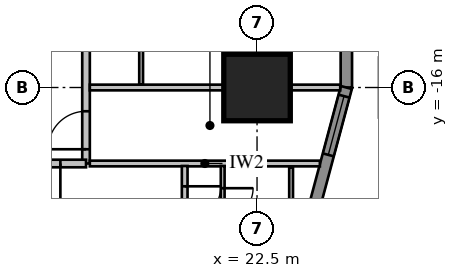
"""IFC4 building model, lengths in metres.
Left out: names, types, materials, properties, quantities, classifications, styles, units other than length and angle.
Written with IfcOpenShell. Run it as: python <this file> out.ifc"""

import sys

from ifc_helpers import new_model, si_unit, direction, frame, frame_2d, origin, origin_2d, place, context, subcontext, project, spatial, rectangle, extrude, element, fill, save


model = new_model("IFC4")
c1 = context("Model", 3, precision=1e-05, world=origin(), true_north=direction((0.0, 1.0)))
c2 = subcontext(c1, "Body", "Model", "MODEL_VIEW")
j1 = project(units=[si_unit("LENGTHUNIT", "METRE"), si_unit("PLANEANGLEUNIT", "RADIAN")], contexts=[c1])
p1 = place(None, origin())
s1 = spatial("IfcSite", under=j1, at=p1, CompositionType="ELEMENT")
p2 = place(p1, origin())
s2 = spatial("IfcBuilding", under=s1, at=p2, CompositionType="ELEMENT")
p3 = place(p2, frame((0.0, 0.0, 23.7)))
s3 = spatial("IfcBuildingStorey", under=s2, at=p3, CompositionType="ELEMENT", Elevation=23.7)
p4 = place(p3, frame((22.5, -16.0, 0.0), z_axis=(0.0, 0.0, 1.0), x_axis=(1.0, 0.0, 0.0)))
e1 = element("IfcColumn", 1, at=p4, inside=s3, PredefinedType="COLUMN", context=c2, shape_type="SweptSolid", body=[
    extrude(rectangle(XDim=1.75, YDim=1.75, at=origin_2d()), origin(), (0.0, 0.0, 1.0), 3.85),
])
p5 = place(p3, frame((24.85, -16.0, 0.0), z_axis=(0.0, 0.0, 1.0), x_axis=(0.0, 1.0, 0.0)))
e2 = element("IfcWall", 2, at=p5, inside=s3, PredefinedType="SOLIDWALL", context=c2, shape_type="SweptSolid", body=[
    extrude(rectangle(XDim=32.0, YDim=0.3, at=frame_2d((16.0, 0.0))), origin(), (0.0, 0.0, 1.0), 3.65),
])
p6 = place(p5, frame((1.2, 0.0, 0.75)))
e3 = element("IfcOpeningElement", 3, at=p6, cuts=e2, PredefinedType="OPENING", context=c2, shape_type="SweptSolid", body=[
    extrude(rectangle(XDim=1.6, YDim=1.8, at=frame_2d((0.8, 0.9))), frame((0.0, 0.17, 0.0), z_axis=(0.0, -1.0, 0.0), x_axis=(1.0, 0.0, 0.0)), (0.0, 0.0, 1.0), 0.34),
])
p7 = place(p5, frame((5.2, 0.0, 0.75)))
e4 = element("IfcOpeningElement", 4, at=p7, cuts=e2, PredefinedType="OPENING", context=c2, shape_type="SweptSolid", body=[
    extrude(rectangle(XDim=1.6, YDim=1.8, at=frame_2d((0.8, 0.9))), frame((0.0, 0.17, 0.0), z_axis=(0.0, -1.0, 0.0), x_axis=(1.0, 0.0, 0.0)), (0.0, 0.0, 1.0), 0.34),
])
p8 = place(p5, frame((17.2, 0.0, 0.75)))
e5 = element("IfcOpeningElement", 5, at=p8, cuts=e2, PredefinedType="OPENING", context=c2, shape_type="SweptSolid", body=[
    extrude(rectangle(XDim=1.6, YDim=1.8, at=frame_2d((0.8, 0.9))), frame((0.0, 0.17, 0.0), z_axis=(0.0, -1.0, 0.0), x_axis=(1.0, 0.0, 0.0)), (0.0, 0.0, 1.0), 0.34),
])
p9 = place(p5, frame((21.2, 0.0, 0.75)))
e6 = element("IfcOpeningElement", 6, at=p9, cuts=e2, PredefinedType="OPENING", context=c2, shape_type="SweptSolid", body=[
    extrude(rectangle(XDim=1.6, YDim=1.8, at=frame_2d((0.8, 0.9))), frame((0.0, 0.17, 0.0), z_axis=(0.0, -1.0, 0.0), x_axis=(1.0, 0.0, 0.0)), (0.0, 0.0, 1.0), 0.34),
])
p10 = place(p5, frame((25.2, 0.0, 0.75)))
e7 = element("IfcOpeningElement", 7, at=p10, cuts=e2, PredefinedType="OPENING", context=c2, shape_type="SweptSolid", body=[
    extrude(rectangle(XDim=1.6, YDim=1.8, at=frame_2d((0.8, 0.9))), frame((0.0, 0.17, 0.0), z_axis=(0.0, -1.0, 0.0), x_axis=(1.0, 0.0, 0.0)), (0.0, 0.0, 1.0), 0.34),
])
p11 = place(p5, frame((29.2, 0.0, 0.75)))
e8 = element("IfcOpeningElement", 8, at=p11, cuts=e2, PredefinedType="OPENING", context=c2, shape_type="SweptSolid", body=[
    extrude(rectangle(XDim=1.6, YDim=1.8, at=frame_2d((0.8, 0.9))), frame((0.0, 0.17, 0.0), z_axis=(0.0, -1.0, 0.0), x_axis=(1.0, 0.0, 0.0)), (0.0, 0.0, 1.0), 0.34),
])
p12 = place(p5, frame((8.8, 0.0, 0.75)))
e9 = element("IfcOpeningElement", 9, at=p12, cuts=e2, PredefinedType="OPENING", context=c2, shape_type="SweptSolid", body=[
    extrude(rectangle(XDim=2.4, YDim=1.8, at=frame_2d((1.2, 0.9))), frame((0.0, 0.17, 0.0), z_axis=(0.0, -1.0, 0.0), x_axis=(1.0, 0.0, 0.0)), (0.0, 0.0, 1.0), 0.34),
])
p13 = place(p5, frame((13.812, 0.0, 0.0)))
e10 = element("IfcOpeningElement", 10, at=p13, cuts=e2, PredefinedType="OPENING", context=c2, shape_type="SweptSolid", body=[
    extrude(rectangle(XDim=1.0, YDim=2.4, at=frame_2d((0.5, 1.2))), frame((0.0, 0.17, 0.0), z_axis=(0.0, -1.0, 0.0), x_axis=(1.0, 0.0, 0.0)), (0.0, 0.0, 1.0), 0.34),
])
p14 = place(p3, frame((23.664, -20.425, 0.0), z_axis=(0.0, 0.0, 1.0), x_axis=(0.258839972501, 0.965920218567, 0.0)))
e11 = element("IfcWall", 11, at=p14, inside=s3, PredefinedType="SOLIDWALL", context=c2, shape_type="SweptSolid", body=[
    extrude(rectangle(XDim=4.581, YDim=0.3, at=frame_2d((2.291, 0.0))), origin(), (0.0, 0.0, 1.0), 3.65),
])
p15 = place(p14, frame((2.746, 0.0, 0.75)))
e12 = element("IfcOpeningElement", 12, at=p15, cuts=e11, PredefinedType="OPENING", context=c2, shape_type="SweptSolid", body=[
    extrude(rectangle(XDim=1.6, YDim=1.8, at=frame_2d((0.8, 0.9))), frame((0.0, 0.17, 0.0), z_axis=(0.0, -1.0, 0.0), x_axis=(1.0, 0.0, 0.0)), (0.0, 0.0, 1.0), 0.34),
])
p16 = place(p3, frame((18.0, -18.0, 0.0), z_axis=(0.0, 0.0, 1.0), x_axis=(0.0, 1.0, 0.0)))
e13 = element("IfcWall", 13, at=p16, inside=s3, PredefinedType="PARTITIONING", context=c2, shape_type="SweptSolid", body=[
    extrude(rectangle(XDim=36.0, YDim=0.2, at=frame_2d((18.0, 0.0))), origin(), (0.0, 0.0, 1.0), 3.65),
])
p17 = place(p16, frame((10.4, 0.0, 0.0)))
e14 = element("IfcOpeningElement", 14, at=p17, cuts=e13, PredefinedType="OPENING", context=c2, shape_type="SweptSolid", body=[
    extrude(rectangle(XDim=1.0, YDim=2.1, at=frame_2d((0.5, 1.05))), frame((0.0, 0.12, 0.0), z_axis=(0.0, -1.0, 0.0), x_axis=(1.0, 0.0, 0.0)), (0.0, 0.0, 1.0), 0.24),
])
p18 = place(p16, frame((0.375, 0.0, 0.0)))
e15 = element("IfcOpeningElement", 15, at=p18, cuts=e13, PredefinedType="OPENING", context=c2, shape_type="SweptSolid", body=[
    extrude(rectangle(XDim=1.0, YDim=2.1, at=frame_2d((0.5, 1.05))), frame((0.0, 0.12, 0.0), z_axis=(0.0, -1.0, 0.0), x_axis=(1.0, 0.0, 0.0)), (0.0, 0.0, 1.0), 0.24),
])
p19 = place(p16, frame((34.375, 0.0, 0.0)))
e16 = element("IfcOpeningElement", 16, at=p19, cuts=e13, PredefinedType="OPENING", context=c2, shape_type="SweptSolid", body=[
    extrude(rectangle(XDim=0.95, YDim=2.1, at=frame_2d((0.475, 1.05))), frame((0.0, 0.12, 0.0), z_axis=(0.0, -1.0, 0.0), x_axis=(1.0, 0.0, 0.0)), (0.0, 0.0, 1.0), 0.24),
])
p20 = place(p3, frame((19.45, -15.925, 0.0), z_axis=(0.0, 0.0, 1.0), x_axis=(0.0, 1.0, 0.0)))
e17 = element("IfcWall", 17, at=p20, inside=s3, PredefinedType="PARTITIONING", context=c2, shape_type="SweptSolid", body=[
    extrude(rectangle(XDim=31.85, YDim=0.1, at=frame_2d((15.925, 0.0))), origin(), (0.0, 0.0, 1.0), 3.65),
])
p21 = place(p20, frame((10.125, 0.0, 0.0)))
e18 = element("IfcOpeningElement", 18, at=p21, cuts=e17, PredefinedType="OPENING", context=c2, shape_type="SweptSolid", body=[
    extrude(rectangle(XDim=1.0, YDim=2.1, at=frame_2d((0.5, 1.05))), frame((0.0, 0.07, 0.0), z_axis=(0.0, -1.0, 0.0), x_axis=(1.0, 0.0, 0.0)), (0.0, 0.0, 1.0), 0.14),
])
p22 = place(p20, frame((8.3, 0.0, 0.0)))
e19 = element("IfcOpeningElement", 19, at=p22, cuts=e17, PredefinedType="OPENING", context=c2, shape_type="SweptSolid", body=[
    extrude(rectangle(XDim=0.8, YDim=2.1, at=frame_2d((0.4, 1.05))), frame((0.0, 0.07, 0.0), z_axis=(0.0, -1.0, 0.0), x_axis=(1.0, 0.0, 0.0)), (0.0, 0.0, 1.0), 0.14),
])
p23 = place(p20, frame((1.725, 0.0, 0.0)))
e20 = element("IfcOpeningElement", 20, at=p23, cuts=e17, PredefinedType="OPENING", context=c2, shape_type="SweptSolid", body=[
    extrude(rectangle(XDim=0.95, YDim=2.1, at=frame_2d((0.475, 1.05))), frame((0.0, 0.07, 0.0), z_axis=(0.0, -1.0, 0.0), x_axis=(1.0, 0.0, 0.0)), (0.0, 0.0, 1.0), 0.14),
])
p24 = place(p20, frame((5.725, 0.0, 0.0)))
e21 = element("IfcOpeningElement", 21, at=p24, cuts=e17, PredefinedType="OPENING", context=c2, shape_type="SweptSolid", body=[
    extrude(rectangle(XDim=0.95, YDim=2.1, at=frame_2d((0.475, 1.05))), frame((0.0, 0.07, 0.0), z_axis=(0.0, -1.0, 0.0), x_axis=(1.0, 0.0, 0.0)), (0.0, 0.0, 1.0), 0.14),
])
p25 = place(p20, frame((17.725, 0.0, 0.0)))
e22 = element("IfcOpeningElement", 22, at=p25, cuts=e17, PredefinedType="OPENING", context=c2, shape_type="SweptSolid", body=[
    extrude(rectangle(XDim=0.95, YDim=2.1, at=frame_2d((0.475, 1.05))), frame((0.0, 0.07, 0.0), z_axis=(0.0, -1.0, 0.0), x_axis=(1.0, 0.0, 0.0)), (0.0, 0.0, 1.0), 0.14),
])
p26 = place(p20, frame((21.725, 0.0, 0.0)))
e23 = element("IfcOpeningElement", 23, at=p26, cuts=e17, PredefinedType="OPENING", context=c2, shape_type="SweptSolid", body=[
    extrude(rectangle(XDim=0.95, YDim=2.1, at=frame_2d((0.475, 1.05))), frame((0.0, 0.07, 0.0), z_axis=(0.0, -1.0, 0.0), x_axis=(1.0, 0.0, 0.0)), (0.0, 0.0, 1.0), 0.14),
])
p27 = place(p20, frame((25.725, 0.0, 0.0)))
e24 = element("IfcOpeningElement", 24, at=p27, cuts=e17, PredefinedType="OPENING", context=c2, shape_type="SweptSolid", body=[
    extrude(rectangle(XDim=0.95, YDim=2.1, at=frame_2d((0.475, 1.05))), frame((0.0, 0.07, 0.0), z_axis=(0.0, -1.0, 0.0), x_axis=(1.0, 0.0, 0.0)), (0.0, 0.0, 1.0), 0.14),
])
p28 = place(p20, frame((29.725, 0.0, 0.0)))
e25 = element("IfcOpeningElement", 25, at=p28, cuts=e17, PredefinedType="OPENING", context=c2, shape_type="SweptSolid", body=[
    extrude(rectangle(XDim=0.95, YDim=2.1, at=frame_2d((0.475, 1.05))), frame((0.0, 0.07, 0.0), z_axis=(0.0, -1.0, 0.0), x_axis=(1.0, 0.0, 0.0)), (0.0, 0.0, 1.0), 0.14),
])
p29 = place(p3, frame((18.1, -18.0, 0.0), z_axis=(0.0, 0.0, 1.0), x_axis=(1.0, 0.0, 0.0)))
e26 = element("IfcWall", 26, at=p29, inside=s3, PredefinedType="PARTITIONING", context=c2, shape_type="SweptSolid", body=[
    extrude(rectangle(XDim=6.053, YDim=0.15, at=frame_2d((3.027, 0.0))), origin(), (0.0, 0.0, 1.0), 3.65),
])
p30 = place(p3, frame((18.1, -16.0, 0.0), z_axis=(0.0, 0.0, 1.0), x_axis=(1.0, 0.0, 0.0)))
e27 = element("IfcWall", 27, at=p30, inside=s3, PredefinedType="PARTITIONING", context=c2, shape_type="SweptSolid", body=[
    extrude(rectangle(XDim=6.589, YDim=0.15, at=frame_2d((3.295, 0.0))), origin(), (0.0, 0.0, 1.0), 3.65),
])
p31 = place(p3, frame((22.15, -15.925, 0.0), z_axis=(0.0, 0.0, 1.0), x_axis=(0.0, 1.0, 0.0)))
e28 = element("IfcWall", 28, at=p31, inside=s3, PredefinedType="PARTITIONING", context=c2, shape_type="SweptSolid", body=[
    extrude(rectangle(XDim=1.45, YDim=0.1, at=frame_2d((0.725, 0.0))), origin(), (0.0, 0.0, 1.0), 3.65),
])
p32 = place(p3, frame((-18.0, -18.0, 0.0), z_axis=(0.0, 0.0, 1.0), x_axis=(1.0, 0.0, 0.0)))
e29 = element("IfcWall", 29, at=p32, inside=s3, PredefinedType="PARTITIONING", context=c2, shape_type="SweptSolid", body=[
    extrude(rectangle(XDim=36.0, YDim=0.2, at=frame_2d((18.0, 0.0))), origin(), (0.0, 0.0, 1.0), 3.65),
])
p33 = place(p32, frame((0.375, 0.0, 0.0)))
e30 = element("IfcOpeningElement", 30, at=p33, cuts=e29, PredefinedType="OPENING", context=c2, shape_type="SweptSolid", body=[
    extrude(rectangle(XDim=1.0, YDim=2.1, at=frame_2d((0.5, 1.05))), frame((0.0, 0.12, 0.0), z_axis=(0.0, -1.0, 0.0), x_axis=(1.0, 0.0, 0.0)), (0.0, 0.0, 1.0), 0.24),
])
p34 = place(p32, frame((2.45, 0.0, 0.0)))
e31 = element("IfcOpeningElement", 31, at=p34, cuts=e29, PredefinedType="OPENING", context=c2, shape_type="SweptSolid", body=[
    extrude(rectangle(XDim=0.8, YDim=2.1, at=frame_2d((0.4, 1.05))), frame((0.0, 0.12, 0.0), z_axis=(0.0, -1.0, 0.0), x_axis=(1.0, 0.0, 0.0)), (0.0, 0.0, 1.0), 0.24),
])
p35 = place(p32, frame((4.05, 0.0, 0.0)))
e32 = element("IfcOpeningElement", 32, at=p35, cuts=e29, PredefinedType="OPENING", context=c2, shape_type="SweptSolid", body=[
    extrude(rectangle(XDim=1.0, YDim=2.1, at=frame_2d((0.5, 1.05))), frame((0.0, 0.12, 0.0), z_axis=(0.0, -1.0, 0.0), x_axis=(1.0, 0.0, 0.0)), (0.0, 0.0, 1.0), 0.24),
])
p36 = place(p32, frame((6.45, 0.0, 0.0)))
e33 = element("IfcOpeningElement", 33, at=p36, cuts=e29, PredefinedType="OPENING", context=c2, shape_type="SweptSolid", body=[
    extrude(rectangle(XDim=0.9, YDim=2.1, at=frame_2d((0.45, 1.05))), frame((0.0, 0.12, 0.0), z_axis=(0.0, -1.0, 0.0), x_axis=(1.0, 0.0, 0.0)), (0.0, 0.0, 1.0), 0.24),
])
p37 = place(p32, frame((8.15, 0.0, 0.0)))
e34 = element("IfcOpeningElement", 34, at=p37, cuts=e29, PredefinedType="OPENING", context=c2, shape_type="SweptSolid", body=[
    extrude(rectangle(XDim=1.0, YDim=2.1, at=frame_2d((0.5, 1.05))), frame((0.0, 0.12, 0.0), z_axis=(0.0, -1.0, 0.0), x_axis=(1.0, 0.0, 0.0)), (0.0, 0.0, 1.0), 0.24),
])
p38 = place(p32, frame((19.8, 0.0, 0.0)))
e35 = element("IfcOpeningElement", 35, at=p38, cuts=e29, PredefinedType="OPENING", context=c2, shape_type="SweptSolid", body=[
    extrude(rectangle(XDim=0.95, YDim=2.1, at=frame_2d((0.475, 1.05))), frame((0.0, 0.12, 0.0), z_axis=(0.0, -1.0, 0.0), x_axis=(1.0, 0.0, 0.0)), (0.0, 0.0, 1.0), 0.24),
])
p39 = place(p32, frame((23.8, 0.0, 0.0)))
e36 = element("IfcOpeningElement", 36, at=p39, cuts=e29, PredefinedType="OPENING", context=c2, shape_type="SweptSolid", body=[
    extrude(rectangle(XDim=0.95, YDim=2.1, at=frame_2d((0.475, 1.05))), frame((0.0, 0.12, 0.0), z_axis=(0.0, -1.0, 0.0), x_axis=(1.0, 0.0, 0.0)), (0.0, 0.0, 1.0), 0.24),
])
p40 = place(p32, frame((27.8, 0.0, 0.0)))
e37 = element("IfcOpeningElement", 37, at=p40, cuts=e29, PredefinedType="OPENING", context=c2, shape_type="SweptSolid", body=[
    extrude(rectangle(XDim=0.95, YDim=2.1, at=frame_2d((0.475, 1.05))), frame((0.0, 0.12, 0.0), z_axis=(0.0, -1.0, 0.0), x_axis=(1.0, 0.0, 0.0)), (0.0, 0.0, 1.0), 0.24),
])
p41 = place(p32, frame((31.8, 0.0, 0.0)))
e38 = element("IfcOpeningElement", 38, at=p41, cuts=e29, PredefinedType="OPENING", context=c2, shape_type="SweptSolid", body=[
    extrude(rectangle(XDim=0.95, YDim=2.1, at=frame_2d((0.475, 1.05))), frame((0.0, 0.12, 0.0), z_axis=(0.0, -1.0, 0.0), x_axis=(1.0, 0.0, 0.0)), (0.0, 0.0, 1.0), 0.24),
])
p42 = place(p32, frame((34.375, 0.0, 0.0)))
e39 = element("IfcOpeningElement", 39, at=p42, cuts=e29, PredefinedType="OPENING", context=c2, shape_type="SweptSolid", body=[
    extrude(rectangle(XDim=0.95, YDim=2.1, at=frame_2d((0.475, 1.05))), frame((0.0, 0.12, 0.0), z_axis=(0.0, -1.0, 0.0), x_axis=(1.0, 0.0, 0.0)), (0.0, 0.0, 1.0), 0.24),
])
p43 = place(p32, frame((11.2, 0.0, 0.0)))
e40 = element("IfcOpeningElement", 40, at=p43, cuts=e29, PredefinedType="OPENING", context=c2, shape_type="SweptSolid", body=[
    extrude(rectangle(XDim=1.0, YDim=2.1, at=frame_2d((0.5, 1.05))), frame((0.0, 0.12, 0.0), z_axis=(0.0, -1.0, 0.0), x_axis=(1.0, 0.0, 0.0)), (0.0, 0.0, 1.0), 0.24),
])
p44 = place(p3, frame((21.596, -18.065, 0.0), z_axis=(0.0, 0.0, 1.0), x_axis=(0.0, -1.0, 0.0)))
e41 = element("IfcWall", 41, at=p44, inside=s3, PredefinedType="PARTITIONING", context=c2, shape_type="SweptSolid", body=[
    extrude(rectangle(XDim=2.335, YDim=0.1, at=frame_2d((1.167, 0.0))), origin(), (0.0, 0.0, 1.0), 3.65),
])
p45 = place(p44, frame((0.585, 0.0, 0.0)))
e42 = element("IfcOpeningElement", 42, at=p45, cuts=e41, PredefinedType="OPENING", context=c2, shape_type="SweptSolid", body=[
    extrude(rectangle(XDim=0.8, YDim=2.1, at=frame_2d((0.4, 1.05))), frame((0.0, 0.07, 0.0), z_axis=(0.0, -1.0, 0.0), x_axis=(1.0, 0.0, 0.0)), (0.0, 0.0, 1.0), 0.14),
])
p46 = place(p3, frame((23.396, -18.1, 0.0), z_axis=(0.0, 0.0, 1.0), x_axis=(0.0, -1.0, 0.0)))
e43 = element("IfcWall", 43, at=p46, inside=s3, PredefinedType="PARTITIONING", context=c2, shape_type="SweptSolid", body=[
    extrude(rectangle(XDim=2.3, YDim=0.1, at=frame_2d((1.15, 0.0))), origin(), (0.0, 0.0, 1.0), 3.65),
])
p47 = place(p3, frame((20.596, -18.065, 0.0), z_axis=(0.0, 0.0, 1.0), x_axis=(0.0, -1.0, 0.0)))
e44 = element("IfcWall", 44, at=p47, inside=s3, PredefinedType="PARTITIONING", context=c2, shape_type="SweptSolid", body=[
    extrude(rectangle(XDim=5.209, YDim=0.15, at=frame_2d((2.604, 0.0))), origin(), (0.0, 0.0, 1.0), 3.65),
])
p48 = place(p47, frame((0.535, 0.0, 0.0)))
e45 = element("IfcOpeningElement", 45, at=p48, cuts=e44, PredefinedType="OPENING", context=c2, shape_type="SweptSolid", body=[
    extrude(rectangle(XDim=0.95, YDim=2.1, at=frame_2d((0.475, 1.05))), frame((0.0, 0.095, 0.0), z_axis=(0.0, -1.0, 0.0), x_axis=(1.0, 0.0, 0.0)), (0.0, 0.0, 1.0), 0.19),
])
p49 = place(p15, origin())
e46 = element("IfcWindow", 46, at=p49, inside=s3, PartitioningType="SINGLE_PANEL", PredefinedType="WINDOW", context=c2, shape_type="SweptSolid", body=[
    extrude(rectangle(XDim=1.6, YDim=1.8, at=frame_2d((0.8, 0.9))), frame((0.0, 0.03, 0.0), z_axis=(0.0, -1.0, 0.0), x_axis=(1.0, 0.0, 0.0)), (0.0, 0.0, 1.0), 0.06),
])
fill(e12, e46)
p50 = place(p18, origin())
e47 = element("IfcDoor", 47, at=p50, inside=s3, OperationType="SINGLE_SWING_LEFT", PredefinedType="DOOR", context=c2, shape_type="SweptSolid", body=[
    extrude(rectangle(XDim=1.0, YDim=2.1, at=frame_2d((0.5, 1.05))), frame((0.0, 0.025, 0.0), z_axis=(0.0, -1.0, 0.0), x_axis=(1.0, 0.0, 0.0)), (0.0, 0.0, 1.0), 0.05),
])
fill(e15, e47)
p51 = place(p42, origin())
e48 = element("IfcDoor", 48, at=p51, inside=s3, OperationType="SINGLE_SWING_RIGHT", PredefinedType="DOOR", context=c2, shape_type="SweptSolid", body=[
    extrude(rectangle(XDim=0.95, YDim=2.1, at=frame_2d((0.475, 1.05))), frame((0.0, 0.025, 0.0), z_axis=(0.0, -1.0, 0.0), x_axis=(1.0, 0.0, 0.0)), (0.0, 0.0, 1.0), 0.05),
])
fill(e39, e48)
p52 = place(p45, origin())
e49 = element("IfcDoor", 49, at=p52, inside=s3, OperationType="SINGLE_SWING_LEFT", PredefinedType="DOOR", context=c2, shape_type="SweptSolid", body=[
    extrude(rectangle(XDim=0.8, YDim=2.1, at=frame_2d((0.4, 1.05))), frame((0.0, 0.025, 0.0), z_axis=(0.0, -1.0, 0.0), x_axis=(1.0, 0.0, 0.0)), (0.0, 0.0, 1.0), 0.05),
])
fill(e42, e49)
p53 = place(p48, origin())
e50 = element("IfcDoor", 50, at=p53, inside=s3, OperationType="SINGLE_SWING_LEFT", PredefinedType="DOOR", context=c2, shape_type="SweptSolid", body=[
    extrude(rectangle(XDim=0.95, YDim=2.1, at=frame_2d((0.475, 1.05))), frame((0.0, 0.025, 0.0), z_axis=(0.0, -1.0, 0.0), x_axis=(1.0, 0.0, 0.0)), (0.0, 0.0, 1.0), 0.05),
])
fill(e45, e50)
save(model, sys.argv[1])
